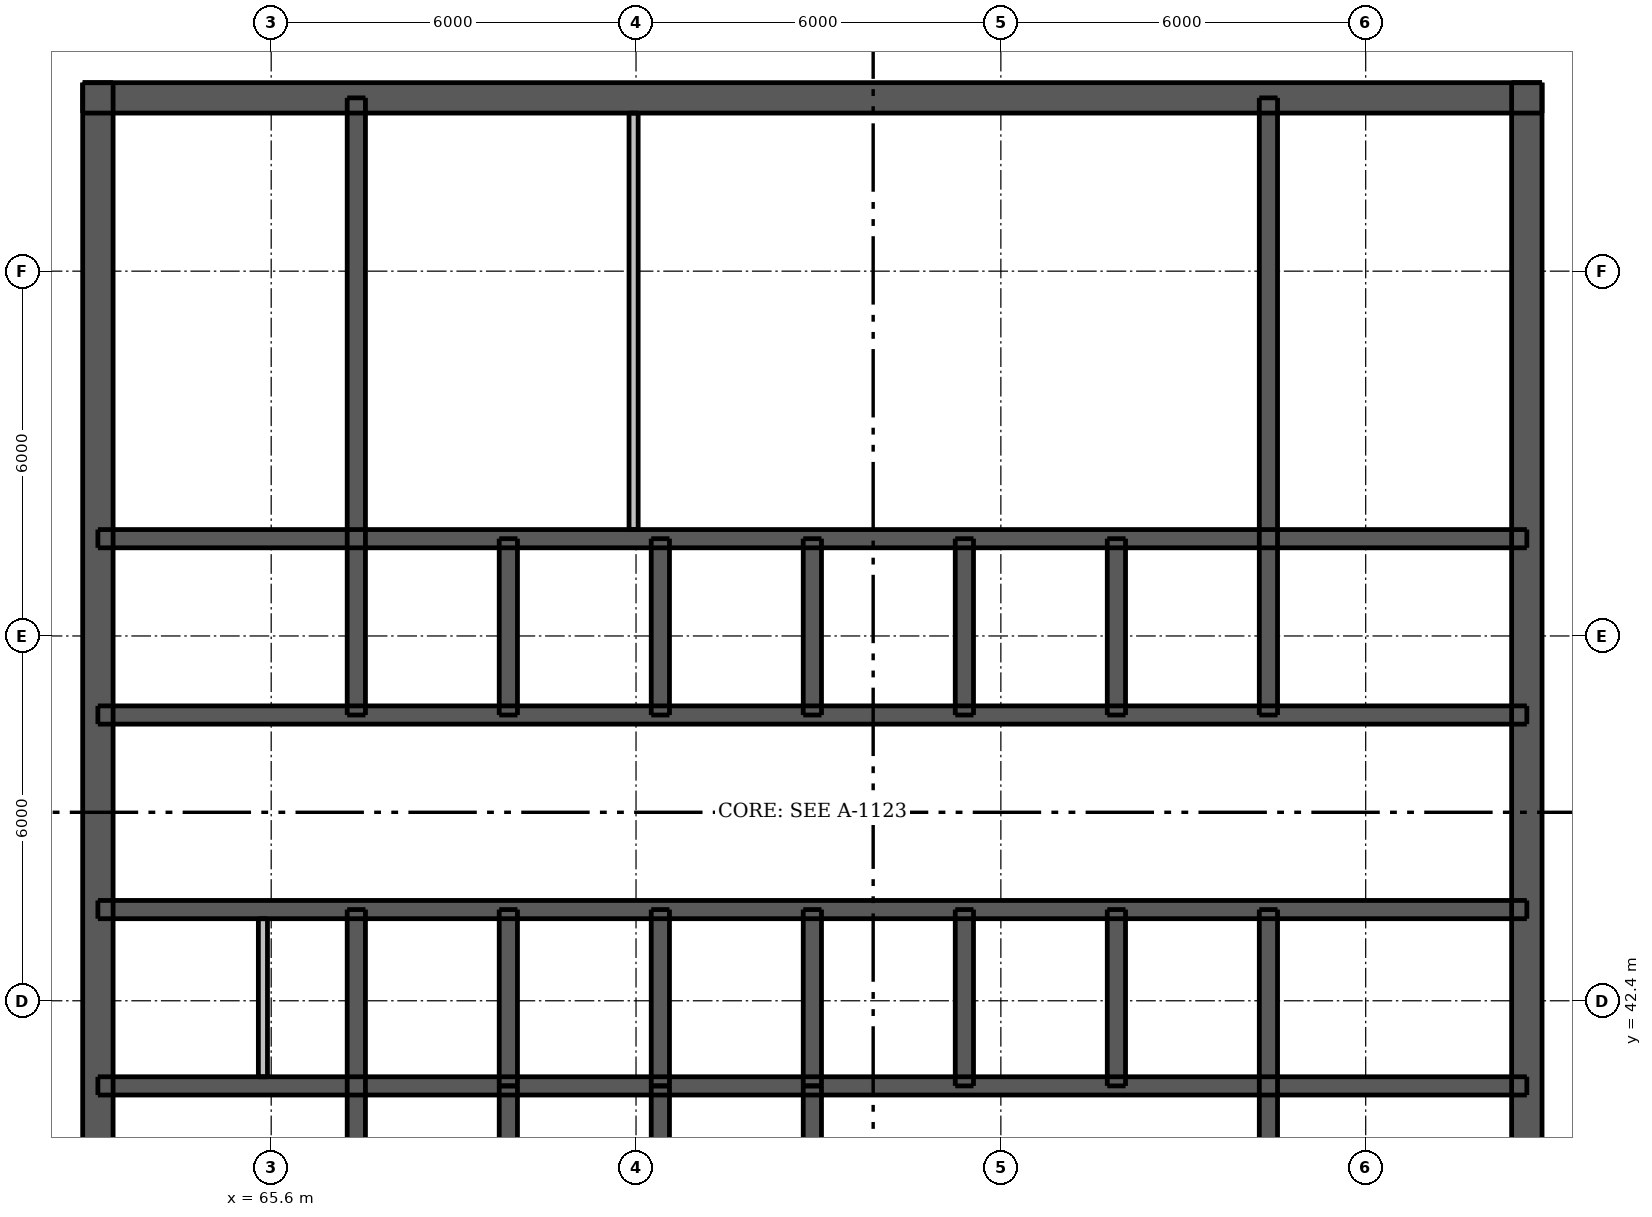
"""IFC4 building model, lengths in metres.
Left out: names, types, materials, properties, quantities, classifications, styles, units other than length and angle.
Written with IfcOpenShell. Run it as: python <this file> out.ifc"""

import sys

from ifc_helpers import new_model, si_unit, direction, frame, frame_2d, origin, place, context, subcontext, project, spatial, rectangle, extrude, element, fill, save


model = new_model("IFC4")
c1 = context("Model", 3, precision=1e-05, world=origin(), true_north=direction((0.0, 1.0)))
c2 = subcontext(c1, "Body", "Model", "MODEL_VIEW")
j1 = project(units=[si_unit("LENGTHUNIT", "METRE"), si_unit("PLANEANGLEUNIT", "RADIAN")], contexts=[c1])
p1 = place(None, origin())
s1 = spatial("IfcSite", under=j1, at=p1, CompositionType="ELEMENT")
p2 = place(p1, origin())
s2 = spatial("IfcBuilding", under=s1, at=p2, CompositionType="ELEMENT")
p3 = place(p2, frame((0.0, 0.0, 286.3)))
s3 = spatial("IfcBuildingStorey", under=s2, at=p3, CompositionType="ELEMENT", Elevation=286.3)
p4 = place(p3, frame((62.5, 57.25, 0.0), z_axis=(0.0, 0.0, 1.0), x_axis=(1.0, 0.0, 0.0)))
e1 = element("IfcWall", 1, at=p4, inside=s3, PredefinedType="SHEAR", context=c2, shape_type="SweptSolid", body=[
    extrude(rectangle(XDim=24.0, YDim=0.5, at=frame_2d((12.0, 0.0))), origin(), (0.0, 0.0, 1.0), 4.2),
])
p5 = place(p4, frame((21.025, 0.0, 0.0)))
e2 = element("IfcOpeningElement", 2, at=p5, cuts=e1, PredefinedType="OPENING", context=c2, shape_type="SweptSolid", body=[
    extrude(rectangle(XDim=1.1, YDim=2.1, at=frame_2d((0.55, 1.05))), frame((0.0, 0.26, 0.0), z_axis=(0.0, -1.0, 0.0), x_axis=(1.0, 0.0, 0.0)), (0.0, 0.0, 1.0), 0.52),
])
p6 = place(p4, frame((1.875, 0.0, 0.0)))
e3 = element("IfcOpeningElement", 3, at=p6, cuts=e1, PredefinedType="OPENING", context=c2, shape_type="SweptSolid", body=[
    extrude(rectangle(XDim=1.1, YDim=2.1, at=frame_2d((0.55, 1.05))), frame((0.0, 0.26, 0.0), z_axis=(0.0, -1.0, 0.0), x_axis=(1.0, 0.0, 0.0)), (0.0, 0.0, 1.0), 0.52),
])
p7 = place(p4, frame((6.405, 0.0, 0.0)))
e4 = element("IfcOpeningElement", 4, at=p7, cuts=e1, PredefinedType="OPENING", context=c2, shape_type="SweptSolid", body=[
    extrude(rectangle(XDim=0.9, YDim=2.1, at=frame_2d((0.45, 1.05))), frame((0.0, 0.26, 0.0), z_axis=(0.0, -1.0, 0.0), x_axis=(1.0, 0.0, 0.0)), (0.0, 0.0, 1.0), 0.52),
])
p8 = place(p4, frame((13.755, 0.0, 0.0)))
e5 = element("IfcOpeningElement", 5, at=p8, cuts=e1, PredefinedType="OPENING", context=c2, shape_type="SweptSolid", body=[
    extrude(rectangle(XDim=0.9, YDim=2.1, at=frame_2d((0.45, 1.05))), frame((0.0, 0.26, 0.0), z_axis=(0.0, -1.0, 0.0), x_axis=(1.0, 0.0, 0.0)), (0.0, 0.0, 1.0), 0.52),
])
p9 = place(p3, frame((62.75, 33.5, 0.0), z_axis=(0.0, 0.0, 1.0), x_axis=(0.0, 1.0, 0.0)))
e6 = element("IfcWall", 6, at=p9, inside=s3, PredefinedType="SHEAR", context=c2, shape_type="SweptSolid", body=[
    extrude(rectangle(XDim=24.0, YDim=0.5, at=frame_2d((12.0, 0.0))), origin(), (0.0, 0.0, 1.0), 4.2),
])
p10 = place(p9, frame((11.2, 0.0, 0.0)))
e7 = element("IfcOpeningElement", 7, at=p10, cuts=e6, PredefinedType="OPENING", context=c2, shape_type="SweptSolid", body=[
    extrude(rectangle(XDim=1.6, YDim=2.1, at=frame_2d((0.8, 1.05))), frame((0.0, 0.26, 0.0), z_axis=(0.0, -1.0, 0.0), x_axis=(1.0, 0.0, 0.0)), (0.0, 0.0, 1.0), 0.52),
])
p11 = place(p3, frame((86.25, 33.5, 0.0), z_axis=(0.0, 0.0, 1.0), x_axis=(0.0, 1.0, 0.0)))
e8 = element("IfcWall", 8, at=p11, inside=s3, PredefinedType="SHEAR", context=c2, shape_type="SweptSolid", body=[
    extrude(rectangle(XDim=24.0, YDim=0.5, at=frame_2d((12.0, 0.0))), origin(), (0.0, 0.0, 1.0), 4.2),
])
p12 = place(p11, frame((11.2, 0.0, 0.0)))
e9 = element("IfcOpeningElement", 9, at=p12, cuts=e8, PredefinedType="OPENING", context=c2, shape_type="SweptSolid", body=[
    extrude(rectangle(XDim=1.6, YDim=2.1, at=frame_2d((0.8, 1.05))), frame((0.0, 0.26, 0.0), z_axis=(0.0, -1.0, 0.0), x_axis=(1.0, 0.0, 0.0)), (0.0, 0.0, 1.0), 0.52),
])
p13 = place(p3, frame((62.75, 41.0, 0.0), z_axis=(0.0, 0.0, 1.0), x_axis=(1.0, 0.0, 0.0)))
e10 = element("IfcWall", 10, at=p13, inside=s3, PredefinedType="SHEAR", context=c2, shape_type="SweptSolid", body=[
    extrude(rectangle(XDim=23.5, YDim=0.3, at=frame_2d((11.75, 0.0))), origin(), (0.0, 0.0, 1.0), 4.2),
])
p14 = place(p3, frame((62.75, 43.9, 0.0), z_axis=(0.0, 0.0, 1.0), x_axis=(1.0, 0.0, 0.0)))
e11 = element("IfcWall", 11, at=p14, inside=s3, PredefinedType="SHEAR", context=c2, shape_type="SweptSolid", body=[
    extrude(rectangle(XDim=23.5, YDim=0.3, at=frame_2d((11.75, 0.0))), origin(), (0.0, 0.0, 1.0), 4.2),
])
p15 = place(p14, frame((1.032, 0.0, 0.0)))
e12 = element("IfcOpeningElement", 12, at=p15, cuts=e11, PredefinedType="OPENING", context=c2, shape_type="SweptSolid", body=[
    extrude(rectangle(XDim=0.9, YDim=2.1, at=frame_2d((0.45, 1.05))), frame((0.0, 0.16, 0.0), z_axis=(0.0, -1.0, 0.0), x_axis=(1.0, 0.0, 0.0)), (0.0, 0.0, 1.0), 0.32),
])
p16 = place(p14, frame((3.007, 0.0, 0.0)))
e13 = element("IfcOpeningElement", 13, at=p16, cuts=e11, PredefinedType="OPENING", context=c2, shape_type="SweptSolid", body=[
    extrude(rectangle(XDim=0.8, YDim=2.1, at=frame_2d((0.4, 1.05))), frame((0.0, 0.16, 0.0), z_axis=(0.0, -1.0, 0.0), x_axis=(1.0, 0.0, 0.0)), (0.0, 0.0, 1.0), 0.32),
])
p17 = place(p14, frame((20.875, 0.0, 0.0)))
e14 = element("IfcOpeningElement", 14, at=p17, cuts=e11, PredefinedType="OPENING", context=c2, shape_type="SweptSolid", body=[
    extrude(rectangle(XDim=0.9, YDim=2.1, at=frame_2d((0.45, 1.05))), frame((0.0, 0.16, 0.0), z_axis=(0.0, -1.0, 0.0), x_axis=(1.0, 0.0, 0.0)), (0.0, 0.0, 1.0), 0.32),
])
p18 = place(p14, frame((5.05, 0.0, 0.0)))
e15 = element("IfcOpeningElement", 15, at=p18, cuts=e11, PredefinedType="OPENING", context=c2, shape_type="SweptSolid", body=[
    extrude(rectangle(XDim=0.9, YDim=2.1, at=frame_2d((0.45, 1.05))), frame((0.0, 0.16, 0.0), z_axis=(0.0, -1.0, 0.0), x_axis=(1.0, 0.0, 0.0)), (0.0, 0.0, 1.0), 0.32),
])
p19 = place(p14, frame((7.55, 0.0, 0.0)))
e16 = element("IfcOpeningElement", 16, at=p19, cuts=e11, PredefinedType="OPENING", context=c2, shape_type="SweptSolid", body=[
    extrude(rectangle(XDim=0.9, YDim=2.1, at=frame_2d((0.45, 1.05))), frame((0.0, 0.16, 0.0), z_axis=(0.0, -1.0, 0.0), x_axis=(1.0, 0.0, 0.0)), (0.0, 0.0, 1.0), 0.32),
])
p20 = place(p14, frame((12.55, 0.0, 0.0)))
e17 = element("IfcOpeningElement", 17, at=p20, cuts=e11, PredefinedType="OPENING", context=c2, shape_type="SweptSolid", body=[
    extrude(rectangle(XDim=0.9, YDim=2.1, at=frame_2d((0.45, 1.05))), frame((0.0, 0.16, 0.0), z_axis=(0.0, -1.0, 0.0), x_axis=(1.0, 0.0, 0.0)), (0.0, 0.0, 1.0), 0.32),
])
p21 = place(p14, frame((15.05, 0.0, 0.0)))
e18 = element("IfcOpeningElement", 18, at=p21, cuts=e11, PredefinedType="OPENING", context=c2, shape_type="SweptSolid", body=[
    extrude(rectangle(XDim=0.9, YDim=2.1, at=frame_2d((0.45, 1.05))), frame((0.0, 0.16, 0.0), z_axis=(0.0, -1.0, 0.0), x_axis=(1.0, 0.0, 0.0)), (0.0, 0.0, 1.0), 0.32),
])
p22 = place(p3, frame((62.75, 47.1, 0.0), z_axis=(0.0, 0.0, 1.0), x_axis=(1.0, 0.0, 0.0)))
e19 = element("IfcWall", 19, at=p22, inside=s3, PredefinedType="SHEAR", context=c2, shape_type="SweptSolid", body=[
    extrude(rectangle(XDim=23.5, YDim=0.3, at=frame_2d((11.75, 0.0))), origin(), (0.0, 0.0, 1.0), 4.2),
])
p23 = place(p22, frame((1.725, 0.0, 0.0)))
e20 = element("IfcOpeningElement", 20, at=p23, cuts=e19, PredefinedType="OPENING", context=c2, shape_type="SweptSolid", body=[
    extrude(rectangle(XDim=0.9, YDim=2.1, at=frame_2d((0.45, 1.05))), frame((0.0, 0.16, 0.0), z_axis=(0.0, -1.0, 0.0), x_axis=(1.0, 0.0, 0.0)), (0.0, 0.0, 1.0), 0.32),
])
p24 = place(p22, frame((20.875, 0.0, 0.0)))
e21 = element("IfcOpeningElement", 21, at=p24, cuts=e19, PredefinedType="OPENING", context=c2, shape_type="SweptSolid", body=[
    extrude(rectangle(XDim=0.9, YDim=2.1, at=frame_2d((0.45, 1.05))), frame((0.0, 0.16, 0.0), z_axis=(0.0, -1.0, 0.0), x_axis=(1.0, 0.0, 0.0)), (0.0, 0.0, 1.0), 0.32),
])
p25 = place(p22, frame((7.55, 0.0, 0.0)))
e22 = element("IfcOpeningElement", 22, at=p25, cuts=e19, PredefinedType="OPENING", context=c2, shape_type="SweptSolid", body=[
    extrude(rectangle(XDim=0.9, YDim=2.1, at=frame_2d((0.45, 1.05))), frame((0.0, 0.16, 0.0), z_axis=(0.0, -1.0, 0.0), x_axis=(1.0, 0.0, 0.0)), (0.0, 0.0, 1.0), 0.32),
])
p26 = place(p22, frame((12.55, 0.0, 0.0)))
e23 = element("IfcOpeningElement", 23, at=p26, cuts=e19, PredefinedType="OPENING", context=c2, shape_type="SweptSolid", body=[
    extrude(rectangle(XDim=0.9, YDim=2.1, at=frame_2d((0.45, 1.05))), frame((0.0, 0.16, 0.0), z_axis=(0.0, -1.0, 0.0), x_axis=(1.0, 0.0, 0.0)), (0.0, 0.0, 1.0), 0.32),
])
p27 = place(p22, frame((17.55, 0.0, 0.0)))
e24 = element("IfcOpeningElement", 24, at=p27, cuts=e19, PredefinedType="OPENING", context=c2, shape_type="SweptSolid", body=[
    extrude(rectangle(XDim=0.9, YDim=2.1, at=frame_2d((0.45, 1.05))), frame((0.0, 0.16, 0.0), z_axis=(0.0, -1.0, 0.0), x_axis=(1.0, 0.0, 0.0)), (0.0, 0.0, 1.0), 0.32),
])
p28 = place(p3, frame((62.75, 50.0, 0.0), z_axis=(0.0, 0.0, 1.0), x_axis=(1.0, 0.0, 0.0)))
e25 = element("IfcWall", 25, at=p28, inside=s3, PredefinedType="SHEAR", context=c2, shape_type="SweptSolid", body=[
    extrude(rectangle(XDim=23.5, YDim=0.3, at=frame_2d((11.75, 0.0))), origin(), (0.0, 0.0, 1.0), 4.2),
])
p29 = place(p3, frame((67.0, 33.75, 0.0), z_axis=(0.0, 0.0, 1.0), x_axis=(0.0, 1.0, 0.0)))
e26 = element("IfcWall", 26, at=p29, inside=s3, PredefinedType="SHEAR", context=c2, shape_type="SweptSolid", body=[
    extrude(rectangle(XDim=10.15, YDim=0.3, at=frame_2d((5.075, 0.0))), origin(), (0.0, 0.0, 1.0), 4.2),
])
p30 = place(p29, frame((0.45, 0.0, 0.0)))
e27 = element("IfcOpeningElement", 27, at=p30, cuts=e26, PredefinedType="OPENING", context=c2, shape_type="SweptSolid", body=[
    extrude(rectangle(XDim=1.1, YDim=2.1, at=frame_2d((0.55, 1.05))), frame((0.0, 0.16, 0.0), z_axis=(0.0, -1.0, 0.0), x_axis=(1.0, 0.0, 0.0)), (0.0, 0.0, 1.0), 0.32),
])
for number, where, z_axis, x_axis in (
    (28, (67.0, 47.1, 0.0), (0.0, 0.0, 1.0), (0.0, 1.0, 0.0)),
    (29, (82.0, 33.75, 0.0), (0.0, 0.0, 1.0), (0.0, 1.0, 0.0)),
    (30, (82.0, 47.1, 0.0), (0.0, 0.0, 1.0), (0.0, 1.0, 0.0)),
):
    element("IfcWall", number, at=place(p3, frame(where, z_axis=z_axis, x_axis=x_axis)), inside=s3, PredefinedType="SHEAR", context=c2, shape_type="SweptSolid", body=[
        extrude(rectangle(XDim=10.15, YDim=0.3, at=frame_2d((5.075, 0.0))), origin(), (0.0, 0.0, 1.0), 4.2),
    ])
for number, where, z_axis, x_axis in (
    (31, (69.5, 41.0, 0.0), (0.0, 0.0, 1.0), (0.0, 1.0, 0.0)),
    (32, (69.5, 47.1, 0.0), (0.0, 0.0, 1.0), (0.0, 1.0, 0.0)),
    (33, (72.0, 41.0, 0.0), (0.0, 0.0, 1.0), (0.0, 1.0, 0.0)),
    (34, (72.0, 47.1, 0.0), (0.0, 0.0, 1.0), (0.0, 1.0, 0.0)),
    (35, (74.5, 41.0, 0.0), (0.0, 0.0, 1.0), (0.0, 1.0, 0.0)),
    (36, (74.5, 47.1, 0.0), (0.0, 0.0, 1.0), (0.0, 1.0, 0.0)),
    (37, (77.0, 41.0, 0.0), (0.0, 0.0, 1.0), (0.0, 1.0, 0.0)),
    (38, (77.0, 47.1, 0.0), (0.0, 0.0, 1.0), (0.0, 1.0, 0.0)),
    (39, (79.5, 41.0, 0.0), (0.0, 0.0, 1.0), (0.0, 1.0, 0.0)),
    (40, (79.5, 47.1, 0.0), (0.0, 0.0, 1.0), (0.0, 1.0, 0.0)),
    (41, (69.5, 38.1, 0.0), (0.0, 0.0, 1.0), (0.0, 1.0, 0.0)),
    (42, (72.0, 38.1, 0.0), (0.0, 0.0, 1.0), (0.0, 1.0, 0.0)),
    (43, (74.5, 38.1, 0.0), (0.0, 0.0, 1.0), (0.0, 1.0, 0.0)),
):
    element("IfcWall", number, at=place(p3, frame(where, z_axis=z_axis, x_axis=x_axis)), inside=s3, PredefinedType="SHEAR", context=c2, shape_type="SweptSolid", body=[
        extrude(rectangle(XDim=2.9, YDim=0.3, at=frame_2d((1.45, 0.0))), origin(), (0.0, 0.0, 1.0), 4.2),
    ])
p31 = place(p3, frame((65.464, 41.15, 0.0), z_axis=(0.0, 0.0, 1.0), x_axis=(0.0, 1.0, 0.0)))
e44 = element("IfcWall", 44, at=p31, inside=s3, PredefinedType="PLUMBINGWALL", context=c2, shape_type="SweptSolid", body=[
    extrude(rectangle(XDim=2.6, YDim=0.15, at=frame_2d((1.3, 0.0))), origin(), (0.0, 0.0, 1.0), 4.2),
])
p32 = place(p3, frame((71.56, 50.15, 0.0), z_axis=(0.0, 0.0, 1.0), x_axis=(0.0, 1.0, 0.0)))
e45 = element("IfcWall", 45, at=p32, inside=s3, PredefinedType="PLUMBINGWALL", context=c2, shape_type="SweptSolid", body=[
    extrude(rectangle(XDim=6.85, YDim=0.15, at=frame_2d((3.425, 0.0))), origin(), (0.0, 0.0, 1.0), 4.2),
])
p33 = place(p5, origin())
e46 = element("IfcDoor", 46, at=p33, inside=s3, OperationType="SINGLE_SWING_RIGHT", PredefinedType="DOOR", context=c2, shape_type="SweptSolid", body=[
    extrude(rectangle(XDim=1.1, YDim=2.1, at=frame_2d((0.55, 1.05))), frame((0.0, -0.188, 0.0), z_axis=(0.0, -1.0, 0.0), x_axis=(1.0, 0.0, 0.0)), (0.0, 0.0, 1.0), 0.05),
])
fill(e2, e46)
p34 = place(p6, origin())
e47 = element("IfcDoor", 47, at=p34, inside=s3, OperationType="SINGLE_SWING_LEFT", PredefinedType="DOOR", context=c2, shape_type="SweptSolid", body=[
    extrude(rectangle(XDim=1.1, YDim=2.1, at=frame_2d((0.55, 1.05))), frame((0.0, -0.188, 0.0), z_axis=(0.0, -1.0, 0.0), x_axis=(1.0, 0.0, 0.0)), (0.0, 0.0, 1.0), 0.05),
])
fill(e3, e47)
p35 = place(p10, origin())
e48 = element("IfcDoor", 48, at=p35, inside=s3, OperationType="DOUBLE_DOOR_SINGLE_SWING", PredefinedType="DOOR", context=c2, shape_type="SweptSolid", body=[
    extrude(rectangle(XDim=1.6, YDim=2.1, at=frame_2d((0.8, 1.05))), frame((0.0, -0.188, 0.0), z_axis=(0.0, -1.0, 0.0), x_axis=(1.0, 0.0, 0.0)), (0.0, 0.0, 1.0), 0.05),
])
fill(e7, e48)
p36 = place(p12, origin())
e49 = element("IfcDoor", 49, at=p36, inside=s3, OperationType="DOUBLE_DOOR_SINGLE_SWING", PredefinedType="DOOR", context=c2, shape_type="SweptSolid", body=[
    extrude(rectangle(XDim=1.6, YDim=2.1, at=frame_2d((0.8, 1.05))), frame((0.0, 0.237, 0.0), z_axis=(0.0, -1.0, 0.0), x_axis=(1.0, 0.0, 0.0)), (0.0, 0.0, 1.0), 0.05),
])
fill(e9, e49)
p37 = place(p15, origin())
e50 = element("IfcDoor", 50, at=p37, inside=s3, OperationType="SINGLE_SWING_LEFT", PredefinedType="DOOR", context=c2, shape_type="SweptSolid", body=[
    extrude(rectangle(XDim=0.9, YDim=2.1, at=frame_2d((0.45, 1.05))), frame((0.0, -0.087, 0.0), z_axis=(0.0, -1.0, 0.0), x_axis=(1.0, 0.0, 0.0)), (0.0, 0.0, 1.0), 0.05),
])
fill(e12, e50)
p38 = place(p16, origin())
e51 = element("IfcDoor", 51, at=p38, inside=s3, OperationType="SINGLE_SWING_RIGHT", PredefinedType="DOOR", context=c2, shape_type="SweptSolid", body=[
    extrude(rectangle(XDim=0.8, YDim=2.1, at=frame_2d((0.4, 1.05))), frame((0.0, -0.087, 0.0), z_axis=(0.0, -1.0, 0.0), x_axis=(1.0, 0.0, 0.0)), (0.0, 0.0, 1.0), 0.05),
])
fill(e13, e51)
p39 = place(p17, origin())
e52 = element("IfcDoor", 52, at=p39, inside=s3, OperationType="SINGLE_SWING_LEFT", PredefinedType="DOOR", context=c2, shape_type="SweptSolid", body=[
    extrude(rectangle(XDim=0.9, YDim=2.1, at=frame_2d((0.45, 1.05))), frame((0.0, -0.087, 0.0), z_axis=(0.0, -1.0, 0.0), x_axis=(1.0, 0.0, 0.0)), (0.0, 0.0, 1.0), 0.05),
])
fill(e14, e52)
p40 = place(p23, origin())
e53 = element("IfcDoor", 53, at=p40, inside=s3, OperationType="SINGLE_SWING_LEFT", PredefinedType="DOOR", context=c2, shape_type="SweptSolid", body=[
    extrude(rectangle(XDim=0.9, YDim=2.1, at=frame_2d((0.45, 1.05))), frame((0.0, 0.138, 0.0), z_axis=(0.0, -1.0, 0.0), x_axis=(1.0, 0.0, 0.0)), (0.0, 0.0, 1.0), 0.05),
])
fill(e20, e53)
p41 = place(p24, origin())
e54 = element("IfcDoor", 54, at=p41, inside=s3, OperationType="SINGLE_SWING_LEFT", PredefinedType="DOOR", context=c2, shape_type="SweptSolid", body=[
    extrude(rectangle(XDim=0.9, YDim=2.1, at=frame_2d((0.45, 1.05))), frame((0.0, 0.138, 0.0), z_axis=(0.0, -1.0, 0.0), x_axis=(1.0, 0.0, 0.0)), (0.0, 0.0, 1.0), 0.05),
])
fill(e21, e54)
p42 = place(p7, origin())
e55 = element("IfcDoor", 55, at=p42, inside=s3, OperationType="SINGLE_SWING_RIGHT", PredefinedType="DOOR", context=c2, shape_type="SweptSolid", body=[
    extrude(rectangle(XDim=0.9, YDim=2.1, at=frame_2d((0.45, 1.05))), frame((0.0, -0.188, 0.0), z_axis=(0.0, -1.0, 0.0), x_axis=(1.0, 0.0, 0.0)), (0.0, 0.0, 1.0), 0.05),
])
fill(e4, e55)
p43 = place(p8, origin())
e56 = element("IfcDoor", 56, at=p43, inside=s3, OperationType="SINGLE_SWING_RIGHT", PredefinedType="DOOR", context=c2, shape_type="SweptSolid", body=[
    extrude(rectangle(XDim=0.9, YDim=2.1, at=frame_2d((0.45, 1.05))), frame((0.0, -0.188, 0.0), z_axis=(0.0, -1.0, 0.0), x_axis=(1.0, 0.0, 0.0)), (0.0, 0.0, 1.0), 0.05),
])
fill(e5, e56)
p44 = place(p18, origin())
e57 = element("IfcDoor", 57, at=p44, inside=s3, OperationType="SINGLE_SWING_RIGHT", PredefinedType="DOOR", context=c2, shape_type="SweptSolid", body=[
    extrude(rectangle(XDim=0.9, YDim=2.1, at=frame_2d((0.45, 1.05))), frame((0.0, -0.087, 0.0), z_axis=(0.0, -1.0, 0.0), x_axis=(1.0, 0.0, 0.0)), (0.0, 0.0, 1.0), 0.05),
])
fill(e15, e57)
p45 = place(p19, origin())
e58 = element("IfcDoor", 58, at=p45, inside=s3, OperationType="SINGLE_SWING_LEFT", PredefinedType="DOOR", context=c2, shape_type="SweptSolid", body=[
    extrude(rectangle(XDim=0.9, YDim=2.1, at=frame_2d((0.45, 1.05))), frame((0.0, -0.087, 0.0), z_axis=(0.0, -1.0, 0.0), x_axis=(1.0, 0.0, 0.0)), (0.0, 0.0, 1.0), 0.05),
])
fill(e16, e58)
p46 = place(p25, origin())
e59 = element("IfcDoor", 59, at=p46, inside=s3, OperationType="SINGLE_SWING_LEFT", PredefinedType="DOOR", context=c2, shape_type="SweptSolid", body=[
    extrude(rectangle(XDim=0.9, YDim=2.1, at=frame_2d((0.45, 1.05))), frame((0.0, 0.138, 0.0), z_axis=(0.0, -1.0, 0.0), x_axis=(1.0, 0.0, 0.0)), (0.0, 0.0, 1.0), 0.05),
])
fill(e22, e59)
p47 = place(p20, origin())
e60 = element("IfcDoor", 60, at=p47, inside=s3, OperationType="SINGLE_SWING_LEFT", PredefinedType="DOOR", context=c2, shape_type="SweptSolid", body=[
    extrude(rectangle(XDim=0.9, YDim=2.1, at=frame_2d((0.45, 1.05))), frame((0.0, -0.087, 0.0), z_axis=(0.0, -1.0, 0.0), x_axis=(1.0, 0.0, 0.0)), (0.0, 0.0, 1.0), 0.05),
])
fill(e17, e60)
p48 = place(p26, origin())
e61 = element("IfcDoor", 61, at=p48, inside=s3, OperationType="SINGLE_SWING_LEFT", PredefinedType="DOOR", context=c2, shape_type="SweptSolid", body=[
    extrude(rectangle(XDim=0.9, YDim=2.1, at=frame_2d((0.45, 1.05))), frame((0.0, 0.138, 0.0), z_axis=(0.0, -1.0, 0.0), x_axis=(1.0, 0.0, 0.0)), (0.0, 0.0, 1.0), 0.05),
])
fill(e23, e61)
p49 = place(p21, origin())
e62 = element("IfcDoor", 62, at=p49, inside=s3, OperationType="SINGLE_SWING_RIGHT", PredefinedType="DOOR", context=c2, shape_type="SweptSolid", body=[
    extrude(rectangle(XDim=0.9, YDim=2.1, at=frame_2d((0.45, 1.05))), frame((0.0, -0.087, 0.0), z_axis=(0.0, -1.0, 0.0), x_axis=(1.0, 0.0, 0.0)), (0.0, 0.0, 1.0), 0.05),
])
fill(e18, e62)
p50 = place(p27, origin())
e63 = element("IfcDoor", 63, at=p50, inside=s3, OperationType="SINGLE_SWING_LEFT", PredefinedType="DOOR", context=c2, shape_type="SweptSolid", body=[
    extrude(rectangle(XDim=0.9, YDim=2.1, at=frame_2d((0.45, 1.05))), frame((0.0, 0.138, 0.0), z_axis=(0.0, -1.0, 0.0), x_axis=(1.0, 0.0, 0.0)), (0.0, 0.0, 1.0), 0.05),
])
fill(e24, e63)
save(model, sys.argv[1])
